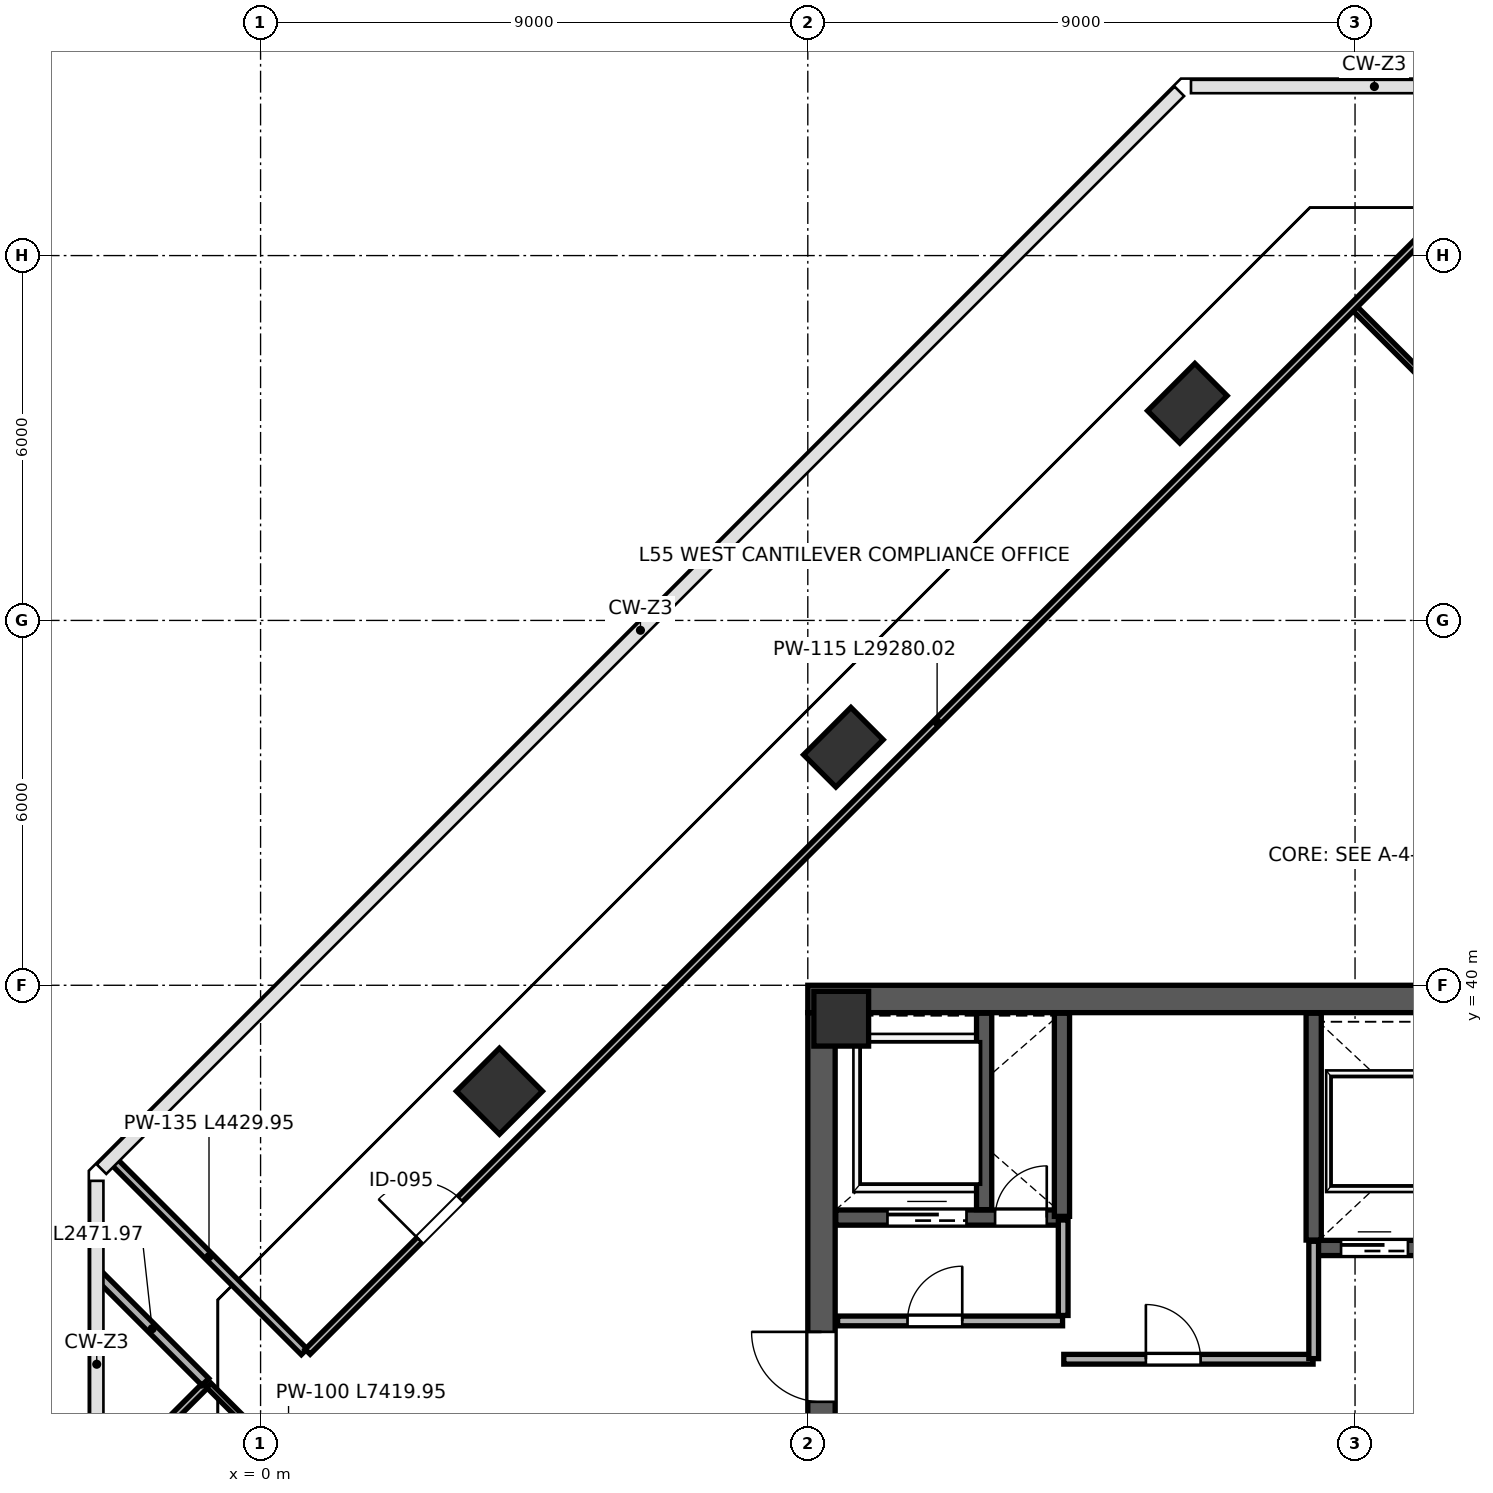
"""IFC4 building model, lengths in metres.
Left out: names, types, materials, properties, quantities, classifications, styles, units other than length and angle.
Written with IfcOpenShell. Run it as: python <this file> out.ifc"""

import sys

from ifc_helpers import new_model, si_unit, direction, frame, frame_2d, origin, origin_2d, place, context, subcontext, project, spatial, rectangle, extrude, source, transform, mapped, element, fill, save


model = new_model("IFC4")
c1 = context("Model", 3, precision=1e-05, world=origin(), true_north=direction((0.0, 1.0)))
c2 = subcontext(c1, "Body", "Model", "MODEL_VIEW")
j1 = project(units=[si_unit("LENGTHUNIT", "METRE"), si_unit("PLANEANGLEUNIT", "RADIAN")], contexts=[c1])
p1 = place(None, origin())
s1 = spatial("IfcSite", under=j1, at=p1, CompositionType="ELEMENT")
p2 = place(p1, origin())
s2 = spatial("IfcBuilding", under=s1, at=p2, CompositionType="ELEMENT")
p3 = place(p2, frame((0.0, 0.0, 245.8)))
s3 = spatial("IfcBuildingStorey", under=s2, at=p3, CompositionType="ELEMENT", Elevation=245.8)
m1 = source(origin(), c2, "Body", "SweptSolid", [
    extrude(rectangle(XDim=0.9, YDim=0.9, at=origin_2d()), origin(), (0.0, 0.0, 1.0), 4.198),
])
p4 = place(p3, frame((9.55, 39.45, 0.001), z_axis=(0.0, 0.0, 1.0), x_axis=(1.0, 0.0, 0.0)))
e1 = element("IfcColumn", 1, at=p4, inside=s3, PredefinedType="COLUMN", context=c2, shape_type="MappedRepresentation", body=[
    mapped(m1, transform((0.0, 0.0, 0.0), scale=1.0)),
])
m2 = source(origin(), c2, "Body", "SweptSolid", [
    extrude(rectangle(XDim=1.0, YDim=1.0, at=origin_2d()), origin(), (0.0, 0.0, 1.0), 4.198),
])
p5 = place(p3, frame((3.928, 38.258, 0.001), z_axis=(0.0, 0.0, 1.0), x_axis=(-0.707106781187, 0.707106781187, 0.0)))
e2 = element("IfcColumn", 2, at=p5, inside=s3, PredefinedType="COLUMN", context=c2, shape_type="MappedRepresentation", body=[
    mapped(m2, transform((0.0, 0.0, 0.0), scale=1.0)),
])
m3 = source(origin(), c2, "Body", "SweptSolid", [
    extrude(rectangle(XDim=0.75, YDim=1.1, at=origin_2d()), origin(), (0.0, 0.0, 1.0), 4.198),
])
for number, where, z_axis, x_axis in (
    (3, (9.585, 43.915, 0.001), (0.0, 0.0, 1.0), (-0.707, 0.707, 0.0)),
    (4, (15.242, 49.572, 0.001), (0.0, 0.0, 1.0), (-0.707, 0.707, 0.0)),
):
    element("IfcColumn", number, at=place(p3, frame(where, z_axis=z_axis, x_axis=x_axis)), inside=s3, PredefinedType="PILASTER", context=c2, shape_type="MappedRepresentation", body=[
        mapped(m3, transform((0.0, 0.0, 0.0), scale=1.0)),
    ])
p6 = place(p3, frame((9.225, 24.45, 0.0), z_axis=(0.0, 0.0, 1.0), x_axis=(0.0, 1.0, 0.0)))
e5 = element("IfcWall", 5, at=p6, inside=s3, PredefinedType="SHEAR", context=c2, shape_type="SweptSolid", body=[
    extrude(rectangle(XDim=15.1, YDim=0.45, at=frame_2d((7.55, 0.0))), origin(), (0.0, 0.0, 1.0), 3.96),
])
p7 = place(p6, frame((8.7, 0.0, 0.0)))
e6 = element("IfcOpeningElement", 6, at=p7, cuts=e5, PredefinedType="OPENING", context=c2, shape_type="SweptSolid", body=[
    extrude(rectangle(XDim=1.15, YDim=2.2, at=frame_2d((0.575, 1.1))), frame((0.0, 0.235, 0.0), z_axis=(0.0, -1.0, 0.0), x_axis=(1.0, 0.0, 0.0)), (0.0, 0.0, 1.0), 0.47),
])
p8 = place(p3, frame((9.0, 39.775, 0.0), z_axis=(0.0, 0.0, 1.0), x_axis=(1.0, 0.0, 0.0)))
e7 = element("IfcWall", 7, at=p8, inside=s3, PredefinedType="SHEAR", context=c2, shape_type="SweptSolid", body=[
    extrude(rectangle(XDim=18.0, YDim=0.45, at=frame_2d((9.0, 0.0))), origin(), (0.0, 0.0, 1.0), 3.96),
])
p9 = place(p3, frame((9.46, 36.18, 0.0), z_axis=(0.0, 0.0, 1.0), x_axis=(1.0, 0.0, 0.0)))
e8 = element("IfcWall", 8, at=p9, inside=s3, PredefinedType="SHEAR", context=c2, shape_type="SweptSolid", body=[
    extrude(rectangle(XDim=3.79, YDim=0.25, at=frame_2d((1.895, 0.0))), origin(), (0.0, 0.0, 1.0), 3.96),
])
p10 = place(p9, frame((2.62, 0.0, 0.0)))
e9 = element("IfcOpeningElement", 9, at=p10, cuts=e8, PredefinedType="OPENING", context=c2, shape_type="SweptSolid", body=[
    extrude(rectangle(XDim=0.85, YDim=2.1, at=frame_2d((0.425, 1.05))), frame((0.0, 0.135, 0.0), z_axis=(0.0, -1.0, 0.0), x_axis=(1.0, 0.0, 0.0)), (0.0, 0.0, 1.0), 0.27),
])
p11 = place(p9, frame((0.85, 0.0, 0.0)))
e10 = element("IfcOpeningElement", 10, at=p11, cuts=e8, PredefinedType="OPENING", context=c2, shape_type="SweptSolid", body=[
    extrude(rectangle(XDim=1.3, YDim=2.25, at=frame_2d((0.65, 1.125))), frame((0.0, 0.135, 0.0), z_axis=(0.0, -1.0, 0.0), x_axis=(1.0, 0.0, 0.0)), (0.0, 0.0, 1.0), 0.27),
])
p12 = place(p3, frame((11.9, 36.31, 0.0), z_axis=(0.0, 0.0, 1.0), x_axis=(0.0, 1.0, 0.0)))
e11 = element("IfcWall", 11, at=p12, inside=s3, PredefinedType="SHEAR", context=c2, shape_type="SweptSolid", body=[
    extrude(rectangle(XDim=3.23, YDim=0.25, at=frame_2d((1.615, 0.0))), origin(), (0.0, 0.0, 1.0), 3.96),
])
p13 = place(p3, frame((13.18, 36.2, 0.0), z_axis=(0.0, 0.0, 1.0), x_axis=(0.0, 1.0, 0.0)))
e12 = element("IfcWall", 12, at=p13, inside=s3, PredefinedType="SHEAR", context=c2, shape_type="SweptSolid", body=[
    extrude(rectangle(XDim=3.34, YDim=0.25, at=frame_2d((1.67, 0.0))), origin(), (0.0, 0.0, 1.0), 3.96),
])
p14 = place(p3, frame((17.32, 35.68, 0.0), z_axis=(0.0, 0.0, 1.0), x_axis=(1.0, 0.0, 0.0)))
e13 = element("IfcWall", 13, at=p14, inside=s3, PredefinedType="SHEAR", context=c2, shape_type="SweptSolid", body=[
    extrude(rectangle(XDim=3.87, YDim=0.25, at=frame_2d((1.935, 0.0))), origin(), (0.0, 0.0, 1.0), 3.96),
])
p15 = place(p14, frame((0.45, 0.0, 0.0)))
e14 = element("IfcOpeningElement", 14, at=p15, cuts=e13, PredefinedType="OPENING", context=c2, shape_type="SweptSolid", body=[
    extrude(rectangle(XDim=1.1, YDim=2.2, at=frame_2d((0.55, 1.1))), frame((0.0, 0.135, 0.0), z_axis=(0.0, -1.0, 0.0), x_axis=(1.0, 0.0, 0.0)), (0.0, 0.0, 1.0), 0.27),
])
p16 = place(p14, frame((2.35, 0.0, 0.0)))
e15 = element("IfcOpeningElement", 15, at=p16, cuts=e13, PredefinedType="OPENING", context=c2, shape_type="SweptSolid", body=[
    extrude(rectangle(XDim=1.1, YDim=2.2, at=frame_2d((0.55, 1.1))), frame((0.0, 0.135, 0.0), z_axis=(0.0, -1.0, 0.0), x_axis=(1.0, 0.0, 0.0)), (0.0, 0.0, 1.0), 0.27),
])
p17 = place(p3, frame((17.32, 35.81, 0.0), z_axis=(0.0, 0.0, 1.0), x_axis=(0.0, 1.0, 0.0)))
e16 = element("IfcWall", 16, at=p17, inside=s3, PredefinedType="SHEAR", context=c2, shape_type="SweptSolid", body=[
    extrude(rectangle(XDim=3.73, YDim=0.25, at=frame_2d((1.865, 0.0))), origin(), (0.0, 0.0, 1.0), 3.96),
])
p18 = place(p3, frame((9.49, 34.48, 0.0), z_axis=(0.0, 0.0, 1.0), x_axis=(1.0, 0.0, 0.0)))
e17 = element("IfcWall", 17, at=p18, inside=s3, PredefinedType="PARTITIONING", context=c2, shape_type="SweptSolid", body=[
    extrude(rectangle(XDim=3.7, YDim=0.16, at=frame_2d((1.85, 0.0))), origin(), (0.0, 0.0, 1.0), 3.96),
])
p19 = place(p18, frame((1.15, 0.0, 0.0)))
e18 = element("IfcOpeningElement", 18, at=p19, cuts=e17, PredefinedType="OPENING", context=c2, shape_type="SweptSolid", body=[
    extrude(rectangle(XDim=0.9, YDim=2.15, at=frame_2d((0.45, 1.075))), frame((0.0, 0.09, 0.0), z_axis=(0.0, -1.0, 0.0), x_axis=(1.0, 0.0, 0.0)), (0.0, 0.0, 1.0), 0.18),
])
p20 = place(p3, frame((13.2, 34.57, 0.0), z_axis=(0.0, 0.0, 1.0), x_axis=(0.0, 1.0, 0.0)))
e19 = element("IfcWall", 19, at=p20, inside=s3, PredefinedType="PARTITIONING", context=c2, shape_type="SweptSolid", body=[
    extrude(rectangle(XDim=1.57, YDim=0.16, at=frame_2d((0.785, 0.0))), origin(), (0.0, 0.0, 1.0), 3.96),
])
p21 = place(p3, frame((13.21, 33.85, 0.0), z_axis=(0.0, 0.0, 1.0), x_axis=(1.0, 0.0, 0.0)))
e20 = element("IfcWall", 20, at=p21, inside=s3, PredefinedType="PARTITIONING", context=c2, shape_type="SweptSolid", body=[
    extrude(rectangle(XDim=4.1, YDim=0.16, at=frame_2d((2.05, 0.0))), origin(), (0.0, 0.0, 1.0), 3.96),
])
p22 = place(p21, frame((1.35, 0.0, 0.0)))
e21 = element("IfcOpeningElement", 21, at=p22, cuts=e20, PredefinedType="OPENING", context=c2, shape_type="SweptSolid", body=[
    extrude(rectangle(XDim=0.9, YDim=2.15, at=frame_2d((0.45, 1.075))), frame((0.0, 0.09, 0.0), z_axis=(0.0, -1.0, 0.0), x_axis=(1.0, 0.0, 0.0)), (0.0, 0.0, 1.0), 0.18),
])
p23 = place(p3, frame((17.32, 33.86, 0.0), z_axis=(0.0, 0.0, 1.0), x_axis=(0.0, 1.0, 0.0)))
e22 = element("IfcWall", 22, at=p23, inside=s3, PredefinedType="PARTITIONING", context=c2, shape_type="SweptSolid", body=[
    extrude(rectangle(XDim=1.93, YDim=0.16, at=frame_2d((0.965, 0.0))), origin(), (0.0, 0.0, 1.0), 3.96),
])
p24 = place(p3, frame((-2.656, 31.673, 0.0), z_axis=(0.0, 0.0, 1.0), x_axis=(0.707106781187, 0.707106781187, 0.0)))
e23 = element("IfcWall", 23, at=p24, inside=s3, PredefinedType="PARTITIONING", context=c2, shape_type="SweptSolid", body=[
    extrude(rectangle(XDim=2.472, YDim=0.115, at=frame_2d((1.236, 0.0))), origin(), (0.0, 0.0, 1.0), 3.96),
])
p25 = place(p3, frame((-2.656, 35.226, 0.0), z_axis=(0.0, 0.0, 1.0), x_axis=(0.707106781187, -0.707106781187, 0.0)))
e24 = element("IfcWall", 24, at=p25, inside=s3, PredefinedType="PARTITIONING", context=c2, shape_type="SweptSolid", body=[
    extrude(rectangle(XDim=2.472, YDim=0.16, at=frame_2d((1.236, 0.0))), origin(), (0.0, 0.0, 1.0), 3.96),
])
p26 = place(p3, frame((-0.852, 33.421, 0.0), z_axis=(0.0, 0.0, 1.0), x_axis=(0.707090329382, -0.707123232608, 0.0)))
e25 = element("IfcWall", 25, at=p26, inside=s3, PredefinedType="PARTITIONING", context=c2, shape_type="SweptSolid", body=[
    extrude(rectangle(XDim=7.42, YDim=0.1, at=frame_2d((3.71, 0.0))), origin(), (0.0, 0.0, 1.0), 3.96),
])
p27 = place(p26, frame((2.9, 0.0, 0.0)))
e26 = element("IfcOpeningElement", 26, at=p27, cuts=e25, PredefinedType="OPENING", context=c2, shape_type="SweptSolid", body=[
    extrude(rectangle(XDim=0.9, YDim=2.15, at=frame_2d((0.45, 1.075))), frame((0.0, 0.06, 0.0), z_axis=(0.0, -1.0, 0.0), x_axis=(1.0, 0.0, 0.0)), (0.0, 0.0, 1.0), 0.12),
])
p28 = place(p26, frame((5.0, 0.0, 0.0)))
e27 = element("IfcOpeningElement", 27, at=p28, cuts=e25, PredefinedType="OPENING", context=c2, shape_type="SweptSolid", body=[
    extrude(rectangle(XDim=0.95, YDim=2.15, at=frame_2d((0.475, 1.075))), frame((0.0, 0.06, 0.0), z_axis=(0.0, -1.0, 0.0), x_axis=(1.0, 0.0, 0.0)), (0.0, 0.0, 1.0), 0.12),
])
p29 = place(p3, frame((17.993, 51.134, 0.0), z_axis=(0.0, 0.0, 1.0), x_axis=(0.707106781187, -0.707106781187, 0.0)))
e28 = element("IfcWall", 28, at=p29, inside=s3, PredefinedType="PARTITIONING", context=c2, shape_type="SweptSolid", body=[
    extrude(rectangle(XDim=22.27, YDim=0.1, at=frame_2d((11.135, 0.0))), origin(), (0.0, 0.0, 1.0), 3.96),
])
p30 = place(p29, frame((10.8, 0.0, 0.0)))
e29 = element("IfcOpeningElement", 29, at=p30, cuts=e28, PredefinedType="OPENING", context=c2, shape_type="SweptSolid", body=[
    extrude(rectangle(XDim=0.95, YDim=2.15, at=frame_2d((0.475, 1.075))), frame((0.0, 0.06, 0.0), z_axis=(0.0, -1.0, 0.0), x_axis=(1.0, 0.0, 0.0)), (0.0, 0.0, 1.0), 0.12),
])
p31 = place(p3, frame((-2.414, 37.105, 0.0), z_axis=(0.0, 0.0, 1.0), x_axis=(0.707106781187, -0.707106781187, 0.0)))
e30 = element("IfcWall", 30, at=p31, inside=s3, PredefinedType="PARTITIONING", context=c2, shape_type="SweptSolid", body=[
    extrude(rectangle(XDim=4.43, YDim=0.135, at=frame_2d((2.215, 0.0))), origin(), (0.0, 0.0, 1.0), 3.96),
])
p32 = place(p3, frame((0.775, 33.973, 0.0), z_axis=(0.0, 0.0, 1.0), x_axis=(0.707106781187, 0.707106781187, 0.0)))
e31 = element("IfcWall", 31, at=p32, inside=s3, PredefinedType="PARTITIONING", context=c2, shape_type="SweptSolid", body=[
    extrude(rectangle(XDim=29.28, YDim=0.115, at=frame_2d((14.64, 0.0))), origin(), (0.0, 0.0, 1.0), 3.96),
])
p33 = place(p32, frame((2.6, 0.0, 0.0)))
e32 = element("IfcOpeningElement", 32, at=p33, cuts=e31, PredefinedType="OPENING", context=c2, shape_type="SweptSolid", body=[
    extrude(rectangle(XDim=0.95, YDim=2.15, at=frame_2d((0.475, 1.075))), frame((0.0, 0.067, 0.0), z_axis=(0.0, -1.0, 0.0), x_axis=(1.0, 0.0, 0.0)), (0.0, 0.0, 1.0), 0.135),
])
m4 = source(origin(), c2, "Body", "SweptSolid", [
    extrude(rectangle(XDim=1.15, YDim=2.2, at=frame_2d((0.575, 1.1))), frame((0.0, 0.025, 0.0), z_axis=(0.0, -1.0, 0.0), x_axis=(1.0, 0.0, 0.0)), (0.0, 0.0, 1.0), 0.05),
])
p34 = place(p7, origin())
e33 = element("IfcDoor", 33, at=p34, inside=s3, OperationType="SINGLE_SWING_RIGHT", PredefinedType="DOOR", context=c2, shape_type="MappedRepresentation", body=[
    mapped(m4, transform((0.0, 0.0, 0.0), scale=1.0)),
])
fill(e6, e33)
m5 = source(origin(), c2, "Body", "SweptSolid", [
    extrude(rectangle(XDim=0.85, YDim=2.1, at=frame_2d((0.425, 1.05))), frame((0.0, 0.025, 0.0), z_axis=(0.0, -1.0, 0.0), x_axis=(1.0, 0.0, 0.0)), (0.0, 0.0, 1.0), 0.05),
])
p35 = place(p10, origin())
e34 = element("IfcDoor", 34, at=p35, inside=s3, OperationType="SINGLE_SWING_RIGHT", PredefinedType="DOOR", context=c2, shape_type="MappedRepresentation", body=[
    mapped(m5, transform((0.0, 0.0, 0.0), scale=1.0)),
])
fill(e9, e34)
m6 = source(origin(), c2, "Body", "SweptSolid", [
    extrude(rectangle(XDim=1.1, YDim=2.2, at=frame_2d((0.55, 1.1))), frame((0.0, 0.025, 0.0), z_axis=(0.0, -1.0, 0.0), x_axis=(1.0, 0.0, 0.0)), (0.0, 0.0, 1.0), 0.05),
])
p36 = place(p15, origin())
e35 = element("IfcDoor", 35, at=p36, inside=s3, OperationType="SLIDING_TO_LEFT", PredefinedType="DOOR", context=c2, shape_type="MappedRepresentation", body=[
    mapped(m6, transform((0.0, 0.0, 0.0), scale=1.0)),
])
fill(e14, e35)
m7 = source(origin(), c2, "Body", "SweptSolid", [
    extrude(rectangle(XDim=1.3, YDim=2.25, at=frame_2d((0.65, 1.125))), frame((0.0, 0.025, 0.0), z_axis=(0.0, -1.0, 0.0), x_axis=(1.0, 0.0, 0.0)), (0.0, 0.0, 1.0), 0.05),
])
p37 = place(p11, origin())
e36 = element("IfcDoor", 36, at=p37, inside=s3, OperationType="SLIDING_TO_LEFT", PredefinedType="DOOR", context=c2, shape_type="MappedRepresentation", body=[
    mapped(m7, transform((0.0, 0.0, 0.0), scale=1.0)),
])
fill(e10, e36)
m8 = source(origin(), c2, "Body", "SweptSolid", [
    extrude(rectangle(XDim=0.9, YDim=2.15, at=frame_2d((0.45, 1.075))), frame((0.0, 0.025, 0.0), z_axis=(0.0, -1.0, 0.0), x_axis=(1.0, 0.0, 0.0)), (0.0, 0.0, 1.0), 0.05),
])
p38 = place(p19, origin())
e37 = element("IfcDoor", 37, at=p38, inside=s3, OperationType="SINGLE_SWING_RIGHT", PredefinedType="DOOR", context=c2, shape_type="MappedRepresentation", body=[
    mapped(m8, transform((0.0, 0.0, 0.0), scale=1.0)),
])
fill(e18, e37)
p39 = place(p22, origin())
e38 = element("IfcDoor", 38, at=p39, inside=s3, OperationType="SINGLE_SWING_LEFT", PredefinedType="DOOR", context=c2, shape_type="MappedRepresentation", body=[
    mapped(m8, transform((0.0, 0.0, 0.0), scale=1.0)),
])
fill(e21, e38)
m9 = source(origin(), c2, "Body", "SweptSolid", [
    extrude(rectangle(XDim=0.95, YDim=2.15, at=frame_2d((0.475, 1.075))), frame((0.0, 0.025, 0.0), z_axis=(0.0, -1.0, 0.0), x_axis=(1.0, 0.0, 0.0)), (0.0, 0.0, 1.0), 0.05),
])
p40 = place(p33, origin())
e39 = element("IfcDoor", 39, at=p40, inside=s3, OperationType="SINGLE_SWING_LEFT", PredefinedType="DOOR", context=c2, shape_type="MappedRepresentation", body=[
    mapped(m9, transform((0.0, 0.0, 0.0), scale=1.0)),
])
fill(e32, e39)
save(model, sys.argv[1])
